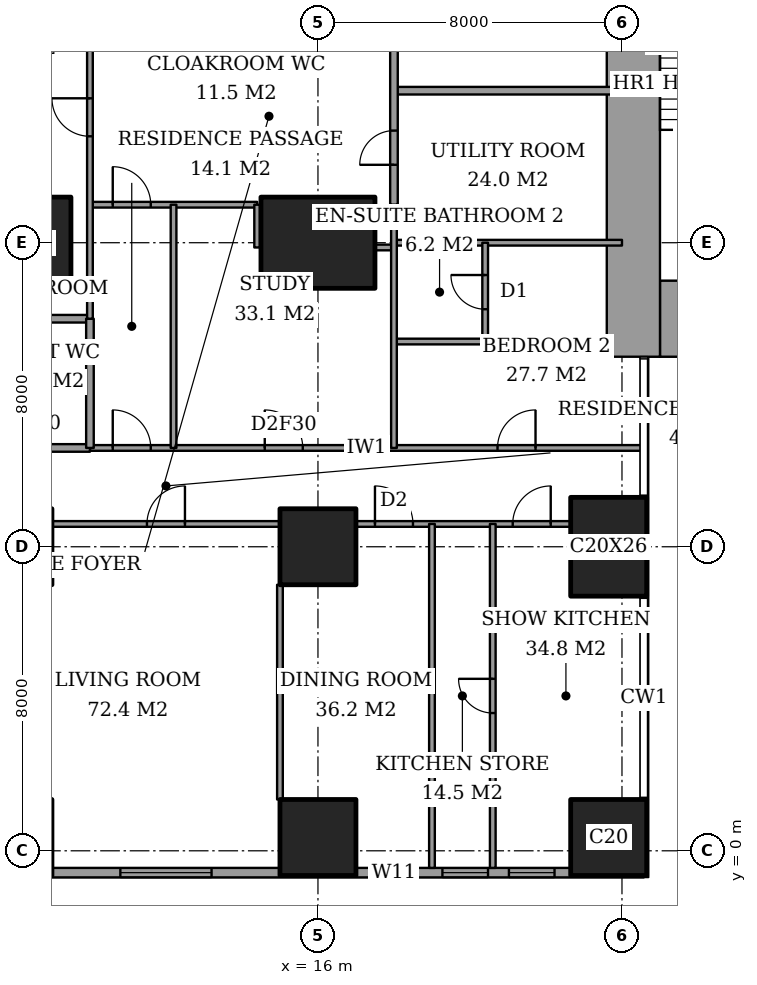
"""IFC4 building model, lengths in metres.
Left out: names, types, materials, properties, quantities, classifications, styles, units other than length and angle.
Written with IfcOpenShell. Run it as: python <this file> out.ifc"""

import sys

from ifc_helpers import new_model, si_unit, direction, frame, frame_2d, origin, origin_2d, place, context, subcontext, project, spatial, rectangle, extrude, element, fill, save


model = new_model("IFC4")
c1 = context("Model", 3, precision=1e-05, world=origin(), true_north=direction((0.0, 1.0)))
c2 = subcontext(c1, "Body", "Model", "MODEL_VIEW")
j1 = project(units=[si_unit("LENGTHUNIT", "METRE"), si_unit("PLANEANGLEUNIT", "RADIAN")], contexts=[c1])
p1 = place(None, origin())
s1 = spatial("IfcSite", under=j1, at=p1, CompositionType="ELEMENT")
p2 = place(p1, origin())
s2 = spatial("IfcBuilding", under=s1, at=p2, CompositionType="ELEMENT")
p3 = place(p2, frame((0.0, 0.0, 153.8)))
s3 = spatial("IfcBuildingStorey", under=s2, at=p3, CompositionType="ELEMENT", Elevation=153.8)
p4 = place(p3, frame((8.0, 16.0, 0.0), z_axis=(0.0, 0.0, 1.0), x_axis=(1.0, 0.0, 0.0)))
e1 = element("IfcColumn", 1, at=p4, inside=s3, PredefinedType="COLUMN", context=c2, shape_type="SweptSolid", body=[
    extrude(rectangle(XDim=3.0, YDim=2.4, at=origin_2d()), origin(), (0.0, 0.0, 1.0), 3.6),
])
for number, where, z_axis, x_axis in (
    (2, (16.0, 0.35, 0.0), (0.0, 0.0, 1.0), (1.0, 0.0, 0.0)),
    (3, (16.0, 8.0, 0.0), (0.0, 0.0, 1.0), (1.0, 0.0, 0.0)),
):
    element("IfcColumn", number, at=place(p3, frame(where, z_axis=z_axis, x_axis=x_axis)), inside=s3, PredefinedType="COLUMN", context=c2, shape_type="SweptSolid", body=[
        extrude(rectangle(XDim=2.0, YDim=2.0, at=origin_2d()), origin(), (0.0, 0.0, 1.0), 3.6),
    ])
p5 = place(p3, frame((16.0, 16.0, 0.0), z_axis=(0.0, 0.0, 1.0), x_axis=(1.0, 0.0, 0.0)))
e4 = element("IfcColumn", 4, at=p5, inside=s3, PredefinedType="COLUMN", context=c2, shape_type="SweptSolid", body=[
    extrude(rectangle(XDim=3.0, YDim=2.4, at=origin_2d()), origin(), (0.0, 0.0, 1.0), 3.6),
])
p6 = place(p3, frame((23.65, 0.35, 0.0), z_axis=(0.0, 0.0, 1.0), x_axis=(1.0, 0.0, 0.0)))
e5 = element("IfcColumn", 5, at=p6, inside=s3, PredefinedType="COLUMN", context=c2, shape_type="SweptSolid", body=[
    extrude(rectangle(XDim=2.0, YDim=2.0, at=origin_2d()), origin(), (0.0, 0.0, 1.0), 3.6),
])
p7 = place(p3, frame((23.65, 8.0, 0.0), z_axis=(0.0, 0.0, 1.0), x_axis=(1.0, 0.0, 0.0)))
e6 = element("IfcColumn", 6, at=p7, inside=s3, PredefinedType="COLUMN", context=c2, shape_type="SweptSolid", body=[
    extrude(rectangle(XDim=2.0, YDim=2.6, at=origin_2d()), origin(), (0.0, 0.0, 1.0), 3.6),
])
p8 = place(p3, frame((25.0, 14.0, 0.0), z_axis=(0.0, 0.0, 1.0), x_axis=(1.0, 0.0, 0.0)))
e7 = element("IfcWall", 7, at=p8, inside=s3, PredefinedType="SHEAR", context=c2, shape_type="SweptSolid", body=[
    extrude(rectangle(XDim=3.15, YDim=2.0, at=frame_2d((1.575, 0.0))), origin(), (0.0, 0.0, 1.0), 3.6),
])
p9 = place(p3, frame((24.3, 13.0, 0.0), z_axis=(0.0, 0.0, 1.0), x_axis=(0.0, 1.0, 0.0)))
e8 = element("IfcWall", 8, at=p9, inside=s3, PredefinedType="SHEAR", context=c2, shape_type="SweptSolid", body=[
    extrude(rectangle(XDim=10.15, YDim=1.4, at=frame_2d((5.075, 0.0))), origin(), (0.0, 0.0, 1.0), 3.6),
])
p10 = place(p3, frame((3.175, -0.575, 0.0), z_axis=(0.0, 0.0, 1.0), x_axis=(1.0, 0.0, 0.0)))
e9 = element("IfcWall", 9, at=p10, inside=s3, PredefinedType="SOLIDWALL", context=c2, shape_type="SweptSolid", body=[
    extrude(rectangle(XDim=21.4, YDim=0.25, at=frame_2d((10.7, 0.0))), origin(), (0.0, 0.0, 1.0), 3.6),
])
p11 = place(p10, frame((0.775, 0.0, 0.4)))
e10 = element("IfcOpeningElement", 10, at=p11, cuts=e9, PredefinedType="OPENING", context=c2, shape_type="SweptSolid", body=[
    extrude(rectangle(XDim=2.4, YDim=2.2, at=frame_2d((1.2, 1.1))), frame((0.0, 0.135, 0.0), z_axis=(0.0, -1.0, 0.0), x_axis=(1.0, 0.0, 0.0)), (0.0, 0.0, 1.0), 0.27),
])
p12 = place(p10, frame((7.625, 0.0, 0.4)))
e11 = element("IfcOpeningElement", 11, at=p12, cuts=e9, PredefinedType="OPENING", context=c2, shape_type="SweptSolid", body=[
    extrude(rectangle(XDim=2.4, YDim=2.2, at=frame_2d((1.2, 1.1))), frame((0.0, 0.135, 0.0), z_axis=(0.0, -1.0, 0.0), x_axis=(1.0, 0.0, 0.0)), (0.0, 0.0, 1.0), 0.27),
])
p13 = place(p10, frame((14.225, 0.0, 0.4)))
e12 = element("IfcOpeningElement", 12, at=p13, cuts=e9, PredefinedType="OPENING", context=c2, shape_type="SweptSolid", body=[
    extrude(rectangle(XDim=1.2, YDim=2.2, at=frame_2d((0.6, 1.1))), frame((0.0, 0.135, 0.0), z_axis=(0.0, -1.0, 0.0), x_axis=(1.0, 0.0, 0.0)), (0.0, 0.0, 1.0), 0.27),
])
p14 = place(p10, frame((16.1, 0.0, 0.4)))
e13 = element("IfcOpeningElement", 13, at=p14, cuts=e9, PredefinedType="OPENING", context=c2, shape_type="SweptSolid", body=[
    extrude(rectangle(XDim=1.2, YDim=2.2, at=frame_2d((0.6, 1.1))), frame((0.0, 0.135, 0.0), z_axis=(0.0, -1.0, 0.0), x_axis=(1.0, 0.0, 0.0)), (0.0, 0.0, 1.0), 0.27),
])
p15 = place(p10, frame((17.85, 0.0, 0.4)))
e14 = element("IfcOpeningElement", 14, at=p15, cuts=e9, PredefinedType="OPENING", context=c2, shape_type="SweptSolid", body=[
    extrude(rectangle(XDim=1.2, YDim=2.2, at=frame_2d((0.6, 1.1))), frame((0.0, 0.135, 0.0), z_axis=(0.0, -1.0, 0.0), x_axis=(1.0, 0.0, 0.0)), (0.0, 0.0, 1.0), 0.27),
])
p16 = place(p3, frame((9.0, 8.6, 0.0), z_axis=(0.0, 0.0, 1.0), x_axis=(1.0, 0.0, 0.0)))
e15 = element("IfcWall", 15, at=p16, inside=s3, PredefinedType="PARTITIONING", context=c2, shape_type="SweptSolid", body=[
    extrude(rectangle(XDim=6.0, YDim=0.15, at=frame_2d((3.0, 0.0))), origin(), (0.0, 0.0, 1.0), 3.35),
])
p17 = place(p16, frame((2.5, 0.0, 0.0)))
e16 = element("IfcOpeningElement", 16, at=p17, cuts=e15, PredefinedType="OPENING", context=c2, shape_type="SweptSolid", body=[
    extrude(rectangle(XDim=1.0, YDim=2.1, at=frame_2d((0.5, 1.05))), frame((0.0, 0.085, 0.0), z_axis=(0.0, -1.0, 0.0), x_axis=(1.0, 0.0, 0.0)), (0.0, 0.0, 1.0), 0.17),
])
p18 = place(p3, frame((17.0, 8.6, 0.0), z_axis=(0.0, 0.0, 1.0), x_axis=(1.0, 0.0, 0.0)))
e17 = element("IfcWall", 17, at=p18, inside=s3, PredefinedType="PARTITIONING", context=c2, shape_type="SweptSolid", body=[
    extrude(rectangle(XDim=5.65, YDim=0.15, at=frame_2d((2.825, 0.0))), origin(), (0.0, 0.0, 1.0), 3.35),
])
p19 = place(p18, frame((0.5, 0.0, 0.0)))
e18 = element("IfcOpeningElement", 18, at=p19, cuts=e17, PredefinedType="OPENING", context=c2, shape_type="SweptSolid", body=[
    extrude(rectangle(XDim=1.0, YDim=2.1, at=frame_2d((0.5, 1.05))), frame((0.0, 0.085, 0.0), z_axis=(0.0, -1.0, 0.0), x_axis=(1.0, 0.0, 0.0)), (0.0, 0.0, 1.0), 0.17),
])
p20 = place(p18, frame((4.125, 0.0, 0.0)))
e19 = element("IfcOpeningElement", 19, at=p20, cuts=e17, PredefinedType="OPENING", context=c2, shape_type="SweptSolid", body=[
    extrude(rectangle(XDim=1.0, YDim=2.1, at=frame_2d((0.5, 1.05))), frame((0.0, 0.085, 0.0), z_axis=(0.0, -1.0, 0.0), x_axis=(1.0, 0.0, 0.0)), (0.0, 0.0, 1.0), 0.17),
])
p21 = place(p3, frame((6.725, 10.6, 0.0), z_axis=(0.0, 0.0, 1.0), x_axis=(1.0, 0.0, 0.0)))
e20 = element("IfcWall", 20, at=p21, inside=s3, PredefinedType="PARTITIONING", context=c2, shape_type="SweptSolid", body=[
    extrude(rectangle(XDim=3.275, YDim=0.2, at=frame_2d((1.637, 0.0))), origin(), (0.0, 0.0, 1.0), 3.35),
])
p22 = place(p21, frame((1.188, 0.0, 0.0)))
e21 = element("IfcOpeningElement", 21, at=p22, cuts=e20, PredefinedType="OPENING", context=c2, shape_type="SweptSolid", body=[
    extrude(rectangle(XDim=0.9, YDim=2.1, at=frame_2d((0.45, 1.05))), frame((0.0, 0.11, 0.0), z_axis=(0.0, -1.0, 0.0), x_axis=(1.0, 0.0, 0.0)), (0.0, 0.0, 1.0), 0.22),
])
p23 = place(p3, frame((10.0, 10.6, 0.0), z_axis=(0.0, 0.0, 1.0), x_axis=(1.0, 0.0, 0.0)))
e22 = element("IfcWall", 22, at=p23, inside=s3, PredefinedType="PARTITIONING", context=c2, shape_type="SweptSolid", body=[
    extrude(rectangle(XDim=14.561, YDim=0.15, at=frame_2d((7.281, 0.0))), origin(), (0.0, 0.0, 1.0), 3.35),
])
p24 = place(p23, frame((0.6, 0.0, 0.0)))
e23 = element("IfcOpeningElement", 23, at=p24, cuts=e22, PredefinedType="OPENING", context=c2, shape_type="SweptSolid", body=[
    extrude(rectangle(XDim=1.0, YDim=2.1, at=frame_2d((0.5, 1.05))), frame((0.0, 0.085, 0.0), z_axis=(0.0, -1.0, 0.0), x_axis=(1.0, 0.0, 0.0)), (0.0, 0.0, 1.0), 0.17),
])
p25 = place(p23, frame((4.6, 0.0, 0.0)))
e24 = element("IfcOpeningElement", 24, at=p25, cuts=e22, PredefinedType="OPENING", context=c2, shape_type="SweptSolid", body=[
    extrude(rectangle(XDim=1.0, YDim=2.1, at=frame_2d((0.5, 1.05))), frame((0.0, 0.085, 0.0), z_axis=(0.0, -1.0, 0.0), x_axis=(1.0, 0.0, 0.0)), (0.0, 0.0, 1.0), 0.17),
])
p26 = place(p23, frame((10.725, 0.0, 0.0)))
e25 = element("IfcOpeningElement", 25, at=p26, cuts=e22, PredefinedType="OPENING", context=c2, shape_type="SweptSolid", body=[
    extrude(rectangle(XDim=1.0, YDim=2.1, at=frame_2d((0.5, 1.05))), frame((0.0, 0.085, 0.0), z_axis=(0.0, -1.0, 0.0), x_axis=(1.0, 0.0, 0.0)), (0.0, 0.0, 1.0), 0.17),
])
p27 = place(p3, frame((18.0, 13.4, 0.0), z_axis=(0.0, 0.0, 1.0), x_axis=(1.0, 0.0, 0.0)))
e26 = element("IfcWall", 26, at=p27, inside=s3, PredefinedType="PARTITIONING", context=c2, shape_type="SweptSolid", body=[
    extrude(rectangle(XDim=2.4, YDim=0.15, at=frame_2d((1.2, 0.0))), origin(), (0.0, 0.0, 1.0), 3.35),
])
p28 = place(p3, frame((6.725, 14.0, 0.0), z_axis=(0.0, 0.0, 1.0), x_axis=(1.0, 0.0, 0.0)))
e27 = element("IfcWall", 27, at=p28, inside=s3, PredefinedType="PARTITIONING", context=c2, shape_type="SweptSolid", body=[
    extrude(rectangle(XDim=3.275, YDim=0.2, at=frame_2d((1.637, 0.0))), origin(), (0.0, 0.0, 1.0), 3.35),
])
p29 = place(p3, frame((17.5, 15.875, 0.0), z_axis=(0.0, 0.0, 1.0), x_axis=(1.0, 0.0, 0.0)))
e28 = element("IfcWall", 28, at=p29, inside=s3, PredefinedType="PARTITIONING", context=c2, shape_type="SweptSolid", body=[
    extrude(rectangle(XDim=0.5, YDim=0.15, at=frame_2d((0.25, 0.0))), origin(), (0.0, 0.0, 1.0), 2.634),
])
p30 = place(p3, frame((18.0, 16.0, 0.0), z_axis=(0.0, 0.0, 1.0), x_axis=(1.0, 0.0, 0.0)))
e29 = element("IfcWall", 29, at=p30, inside=s3, PredefinedType="PARTITIONING", context=c2, shape_type="SweptSolid", body=[
    extrude(rectangle(XDim=6.0, YDim=0.15, at=frame_2d((3.0, 0.0))), origin(), (0.0, 0.0, 1.0), 2.634),
])
p31 = place(p3, frame((10.0, 17.0, 0.0), z_axis=(0.0, 0.0, 1.0), x_axis=(1.0, 0.0, 0.0)))
e30 = element("IfcWall", 30, at=p31, inside=s3, PredefinedType="PARTITIONING", context=c2, shape_type="SweptSolid", body=[
    extrude(rectangle(XDim=4.4, YDim=0.15, at=frame_2d((2.2, 0.0))), origin(), (0.0, 0.0, 1.0), 3.35),
])
p32 = place(p31, frame((0.6, 0.0, 0.0)))
e31 = element("IfcOpeningElement", 31, at=p32, cuts=e30, PredefinedType="OPENING", context=c2, shape_type="SweptSolid", body=[
    extrude(rectangle(XDim=1.0, YDim=2.1, at=frame_2d((0.5, 1.05))), frame((0.0, 0.085, 0.0), z_axis=(0.0, -1.0, 0.0), x_axis=(1.0, 0.0, 0.0)), (0.0, 0.0, 1.0), 0.17),
])
p33 = place(p3, frame((18.0, 20.0, 0.0), z_axis=(0.0, 0.0, 1.0), x_axis=(1.0, 0.0, 0.0)))
e32 = element("IfcWall", 32, at=p33, inside=s3, PredefinedType="PARTITIONING", context=c2, shape_type="SweptSolid", body=[
    extrude(rectangle(XDim=6.0, YDim=0.2, at=frame_2d((3.0, 0.0))), origin(), (0.0, 0.0, 1.0), 3.35),
])
p34 = place(p3, frame((10.0, 10.6, 0.0), z_axis=(0.0, 0.0, 1.0), x_axis=(0.0, 1.0, 0.0)))
e33 = element("IfcWall", 33, at=p34, inside=s3, PredefinedType="PARTITIONING", context=c2, shape_type="SweptSolid", body=[
    extrude(rectangle(XDim=3.4, YDim=0.2, at=frame_2d((1.7, 0.0))), origin(), (0.0, 0.0, 1.0), 3.35),
])
p35 = place(p3, frame((10.0, 14.0, 0.0), z_axis=(0.0, 0.0, 1.0), x_axis=(0.0, 1.0, 0.0)))
e34 = element("IfcWall", 34, at=p35, inside=s3, PredefinedType="PARTITIONING", context=c2, shape_type="SweptSolid", body=[
    extrude(rectangle(XDim=7.6, YDim=0.15, at=frame_2d((3.8, 0.0))), origin(), (0.0, 0.0, 1.0), 3.35),
])
p36 = place(p35, frame((4.8, 0.0, 0.0)))
e35 = element("IfcOpeningElement", 35, at=p36, cuts=e34, PredefinedType="OPENING", context=c2, shape_type="SweptSolid", body=[
    extrude(rectangle(XDim=1.0, YDim=2.1, at=frame_2d((0.5, 1.05))), frame((0.0, 0.085, 0.0), z_axis=(0.0, -1.0, 0.0), x_axis=(1.0, 0.0, 0.0)), (0.0, 0.0, 1.0), 0.17),
])
p37 = place(p3, frame((12.2, 10.6, 0.0), z_axis=(0.0, 0.0, 1.0), x_axis=(0.0, 1.0, 0.0)))
e36 = element("IfcWall", 36, at=p37, inside=s3, PredefinedType="PARTITIONING", context=c2, shape_type="SweptSolid", body=[
    extrude(rectangle(XDim=6.4, YDim=0.15, at=frame_2d((3.2, 0.0))), origin(), (0.0, 0.0, 1.0), 3.35),
])
p38 = place(p3, frame((14.4, 15.875, 0.0), z_axis=(0.0, 0.0, 1.0), x_axis=(0.0, 1.0, 0.0)))
e37 = element("IfcWall", 37, at=p38, inside=s3, PredefinedType="PARTITIONING", context=c2, shape_type="SweptSolid", body=[
    extrude(rectangle(XDim=1.125, YDim=0.15, at=frame_2d((0.562, 0.0))), origin(), (0.0, 0.0, 1.0), 3.35),
])
p39 = place(p3, frame((15.0, 1.35, 0.0), z_axis=(0.0, 0.0, 1.0), x_axis=(0.0, 1.0, 0.0)))
e38 = element("IfcWall", 38, at=p39, inside=s3, PredefinedType="PARTITIONING", context=c2, shape_type="SweptSolid", body=[
    extrude(rectangle(XDim=5.65, YDim=0.15, at=frame_2d((2.825, 0.0))), origin(), (0.0, 0.0, 1.0), 3.35),
])
p40 = place(p3, frame((18.0, 17.0, 0.0), z_axis=(0.0, 0.0, 1.0), x_axis=(0.0, 1.0, 0.0)))
e39 = element("IfcWall", 39, at=p40, inside=s3, PredefinedType="PARTITIONING", context=c2, shape_type="SweptSolid", body=[
    extrude(rectangle(XDim=7.0, YDim=0.2, at=frame_2d((3.5, 0.0))), origin(), (0.0, 0.0, 1.0), 3.35),
])
p41 = place(p40, frame((4.4, 0.0, 0.0)))
e40 = element("IfcOpeningElement", 40, at=p41, cuts=e39, PredefinedType="OPENING", context=c2, shape_type="SweptSolid", body=[
    extrude(rectangle(XDim=1.2, YDim=2.4, at=frame_2d((0.6, 1.2))), frame((0.0, 0.11, 0.0), z_axis=(0.0, -1.0, 0.0), x_axis=(1.0, 0.0, 0.0)), (0.0, 0.0, 1.0), 0.22),
])
p42 = place(p40, frame((1.05, 0.0, 0.0)))
e41 = element("IfcOpeningElement", 41, at=p42, cuts=e39, PredefinedType="OPENING", context=c2, shape_type="SweptSolid", body=[
    extrude(rectangle(XDim=0.9, YDim=2.1, at=frame_2d((0.45, 1.05))), frame((0.0, 0.11, 0.0), z_axis=(0.0, -1.0, 0.0), x_axis=(1.0, 0.0, 0.0)), (0.0, 0.0, 1.0), 0.22),
])
p43 = place(p3, frame((18.0, 10.6, 0.0), z_axis=(0.0, 0.0, 1.0), x_axis=(0.0, 1.0, 0.0)))
e42 = element("IfcWall", 42, at=p43, inside=s3, PredefinedType="PARTITIONING", context=c2, shape_type="SweptSolid", body=[
    extrude(rectangle(XDim=6.4, YDim=0.15, at=frame_2d((3.2, 0.0))), origin(), (0.0, 0.0, 1.0), 3.35),
])
p44 = place(p3, frame((19.0, -0.45, 0.0), z_axis=(0.0, 0.0, 1.0), x_axis=(0.0, 1.0, 0.0)))
e43 = element("IfcWall", 43, at=p44, inside=s3, PredefinedType="PARTITIONING", context=c2, shape_type="SweptSolid", body=[
    extrude(rectangle(XDim=9.05, YDim=0.15, at=frame_2d((4.525, 0.0))), origin(), (0.0, 0.0, 1.0), 3.35),
])
p45 = place(p3, frame((20.4, 13.4, 0.0), z_axis=(0.0, 0.0, 1.0), x_axis=(0.0, 1.0, 0.0)))
e44 = element("IfcWall", 44, at=p45, inside=s3, PredefinedType="PARTITIONING", context=c2, shape_type="SweptSolid", body=[
    extrude(rectangle(XDim=2.6, YDim=0.15, at=frame_2d((1.3, 0.0))), origin(), (0.0, 0.0, 1.0), 3.35),
])
p46 = place(p45, frame((0.85, 0.0, 0.0)))
e45 = element("IfcOpeningElement", 45, at=p46, cuts=e44, PredefinedType="OPENING", context=c2, shape_type="SweptSolid", body=[
    extrude(rectangle(XDim=0.9, YDim=2.1, at=frame_2d((0.45, 1.05))), frame((0.0, 0.085, 0.0), z_axis=(0.0, -1.0, 0.0), x_axis=(1.0, 0.0, 0.0)), (0.0, 0.0, 1.0), 0.17),
])
p47 = place(p3, frame((20.6, -0.45, 0.0), z_axis=(0.0, 0.0, 1.0), x_axis=(0.0, 1.0, 0.0)))
e46 = element("IfcWall", 46, at=p47, inside=s3, PredefinedType="PARTITIONING", context=c2, shape_type="SweptSolid", body=[
    extrude(rectangle(XDim=9.05, YDim=0.15, at=frame_2d((4.525, 0.0))), origin(), (0.0, 0.0, 1.0), 3.35),
])
p48 = place(p47, frame((4.075, 0.0, 0.0)))
e47 = element("IfcOpeningElement", 47, at=p48, cuts=e46, PredefinedType="OPENING", context=c2, shape_type="SweptSolid", body=[
    extrude(rectangle(XDim=0.9, YDim=2.1, at=frame_2d((0.45, 1.05))), frame((0.0, 0.085, 0.0), z_axis=(0.0, -1.0, 0.0), x_axis=(1.0, 0.0, 0.0)), (0.0, 0.0, 1.0), 0.17),
])
p49 = place(p12, origin())
e48 = element("IfcWindow", 48, at=p49, inside=s3, PartitioningType="SINGLE_PANEL", PredefinedType="WINDOW", context=c2, shape_type="SweptSolid", body=[
    extrude(rectangle(XDim=2.4, YDim=2.2, at=frame_2d((1.2, 1.1))), frame((0.0, 0.03, 0.0), z_axis=(0.0, -1.0, 0.0), x_axis=(1.0, 0.0, 0.0)), (0.0, 0.0, 1.0), 0.06),
])
fill(e11, e48)
p50 = place(p13, origin())
e49 = element("IfcWindow", 49, at=p50, inside=s3, PartitioningType="SINGLE_PANEL", PredefinedType="WINDOW", context=c2, shape_type="SweptSolid", body=[
    extrude(rectangle(XDim=1.2, YDim=2.2, at=frame_2d((0.6, 1.1))), frame((0.0, 0.03, 0.0), z_axis=(0.0, -1.0, 0.0), x_axis=(1.0, 0.0, 0.0)), (0.0, 0.0, 1.0), 0.06),
])
fill(e12, e49)
p51 = place(p14, origin())
e50 = element("IfcWindow", 50, at=p51, inside=s3, PartitioningType="SINGLE_PANEL", PredefinedType="WINDOW", context=c2, shape_type="SweptSolid", body=[
    extrude(rectangle(XDim=1.2, YDim=2.2, at=frame_2d((0.6, 1.1))), frame((0.0, 0.03, 0.0), z_axis=(0.0, -1.0, 0.0), x_axis=(1.0, 0.0, 0.0)), (0.0, 0.0, 1.0), 0.06),
])
fill(e13, e50)
p52 = place(p15, origin())
e51 = element("IfcWindow", 51, at=p52, inside=s3, PartitioningType="SINGLE_PANEL", PredefinedType="WINDOW", context=c2, shape_type="SweptSolid", body=[
    extrude(rectangle(XDim=1.2, YDim=2.2, at=frame_2d((0.6, 1.1))), frame((0.0, 0.03, 0.0), z_axis=(0.0, -1.0, 0.0), x_axis=(1.0, 0.0, 0.0)), (0.0, 0.0, 1.0), 0.06),
])
fill(e14, e51)
p53 = place(p17, origin())
e52 = element("IfcDoor", 52, at=p53, inside=s3, OperationType="SINGLE_SWING_LEFT", PredefinedType="DOOR", context=c2, shape_type="SweptSolid", body=[
    extrude(rectangle(XDim=1.0, YDim=2.1, at=frame_2d((0.5, 1.05))), frame((0.0, 0.025, 0.0), z_axis=(0.0, -1.0, 0.0), x_axis=(1.0, 0.0, 0.0)), (0.0, 0.0, 1.0), 0.05),
])
fill(e16, e52)
p54 = place(p19, origin())
e53 = element("IfcDoor", 53, at=p54, inside=s3, OperationType="SINGLE_SWING_RIGHT", PredefinedType="DOOR", context=c2, shape_type="SweptSolid", body=[
    extrude(rectangle(XDim=1.0, YDim=2.1, at=frame_2d((0.5, 1.05))), frame((0.0, 0.025, 0.0), z_axis=(0.0, -1.0, 0.0), x_axis=(1.0, 0.0, 0.0)), (0.0, 0.0, 1.0), 0.05),
])
fill(e18, e53)
p55 = place(p48, origin())
e54 = element("IfcDoor", 54, at=p55, inside=s3, OperationType="SINGLE_SWING_LEFT", PredefinedType="DOOR", context=c2, shape_type="SweptSolid", body=[
    extrude(rectangle(XDim=0.9, YDim=2.1, at=frame_2d((0.45, 1.05))), frame((0.0, 0.025, 0.0), z_axis=(0.0, -1.0, 0.0), x_axis=(1.0, 0.0, 0.0)), (0.0, 0.0, 1.0), 0.05),
])
fill(e47, e54)
p56 = place(p20, origin())
e55 = element("IfcDoor", 55, at=p56, inside=s3, OperationType="SINGLE_SWING_LEFT", PredefinedType="DOOR", context=c2, shape_type="SweptSolid", body=[
    extrude(rectangle(XDim=1.0, YDim=2.1, at=frame_2d((0.5, 1.05))), frame((0.0, 0.025, 0.0), z_axis=(0.0, -1.0, 0.0), x_axis=(1.0, 0.0, 0.0)), (0.0, 0.0, 1.0), 0.05),
])
fill(e19, e55)
p57 = place(p24, origin())
e56 = element("IfcDoor", 56, at=p57, inside=s3, OperationType="SINGLE_SWING_RIGHT", PredefinedType="DOOR", context=c2, shape_type="SweptSolid", body=[
    extrude(rectangle(XDim=1.0, YDim=2.1, at=frame_2d((0.5, 1.05))), frame((0.0, 0.025, 0.0), z_axis=(0.0, -1.0, 0.0), x_axis=(1.0, 0.0, 0.0)), (0.0, 0.0, 1.0), 0.05),
])
fill(e23, e56)
p58 = place(p36, origin())
e57 = element("IfcDoor", 57, at=p58, inside=s3, OperationType="SINGLE_SWING_LEFT", PredefinedType="DOOR", context=c2, shape_type="SweptSolid", body=[
    extrude(rectangle(XDim=1.0, YDim=2.1, at=frame_2d((0.5, 1.05))), frame((0.0, 0.025, 0.0), z_axis=(0.0, -1.0, 0.0), x_axis=(1.0, 0.0, 0.0)), (0.0, 0.0, 1.0), 0.05),
])
fill(e35, e57)
p59 = place(p32, origin())
e58 = element("IfcDoor", 58, at=p59, inside=s3, OperationType="SINGLE_SWING_RIGHT", PredefinedType="DOOR", context=c2, shape_type="SweptSolid", body=[
    extrude(rectangle(XDim=1.0, YDim=2.1, at=frame_2d((0.5, 1.05))), frame((0.0, 0.025, 0.0), z_axis=(0.0, -1.0, 0.0), x_axis=(1.0, 0.0, 0.0)), (0.0, 0.0, 1.0), 0.05),
])
fill(e31, e58)
p60 = place(p25, origin())
e59 = element("IfcDoor", 59, at=p60, inside=s3, OperationType="SINGLE_SWING_RIGHT", PredefinedType="DOOR", context=c2, shape_type="SweptSolid", body=[
    extrude(rectangle(XDim=1.0, YDim=2.1, at=frame_2d((0.5, 1.05))), frame((0.0, 0.025, 0.0), z_axis=(0.0, -1.0, 0.0), x_axis=(1.0, 0.0, 0.0)), (0.0, 0.0, 1.0), 0.05),
])
fill(e24, e59)
p61 = place(p46, origin())
e60 = element("IfcDoor", 60, at=p61, inside=s3, OperationType="SINGLE_SWING_LEFT", PredefinedType="DOOR", context=c2, shape_type="SweptSolid", body=[
    extrude(rectangle(XDim=0.9, YDim=2.1, at=frame_2d((0.45, 1.05))), frame((0.0, 0.025, 0.0), z_axis=(0.0, -1.0, 0.0), x_axis=(1.0, 0.0, 0.0)), (0.0, 0.0, 1.0), 0.05),
])
fill(e45, e60)
p62 = place(p26, origin())
e61 = element("IfcDoor", 61, at=p62, inside=s3, OperationType="SINGLE_SWING_LEFT", PredefinedType="DOOR", context=c2, shape_type="SweptSolid", body=[
    extrude(rectangle(XDim=1.0, YDim=2.1, at=frame_2d((0.5, 1.05))), frame((0.0, 0.025, 0.0), z_axis=(0.0, -1.0, 0.0), x_axis=(1.0, 0.0, 0.0)), (0.0, 0.0, 1.0), 0.05),
])
fill(e25, e61)
p63 = place(p42, origin())
e62 = element("IfcDoor", 62, at=p63, inside=s3, OperationType="SINGLE_SWING_RIGHT", PredefinedType="DOOR", context=c2, shape_type="SweptSolid", body=[
    extrude(rectangle(XDim=0.9, YDim=2.1, at=frame_2d((0.45, 1.05))), frame((0.0, 0.025, 0.0), z_axis=(0.0, -1.0, 0.0), x_axis=(1.0, 0.0, 0.0)), (0.0, 0.0, 1.0), 0.05),
])
fill(e41, e62)
save(model, sys.argv[1])
